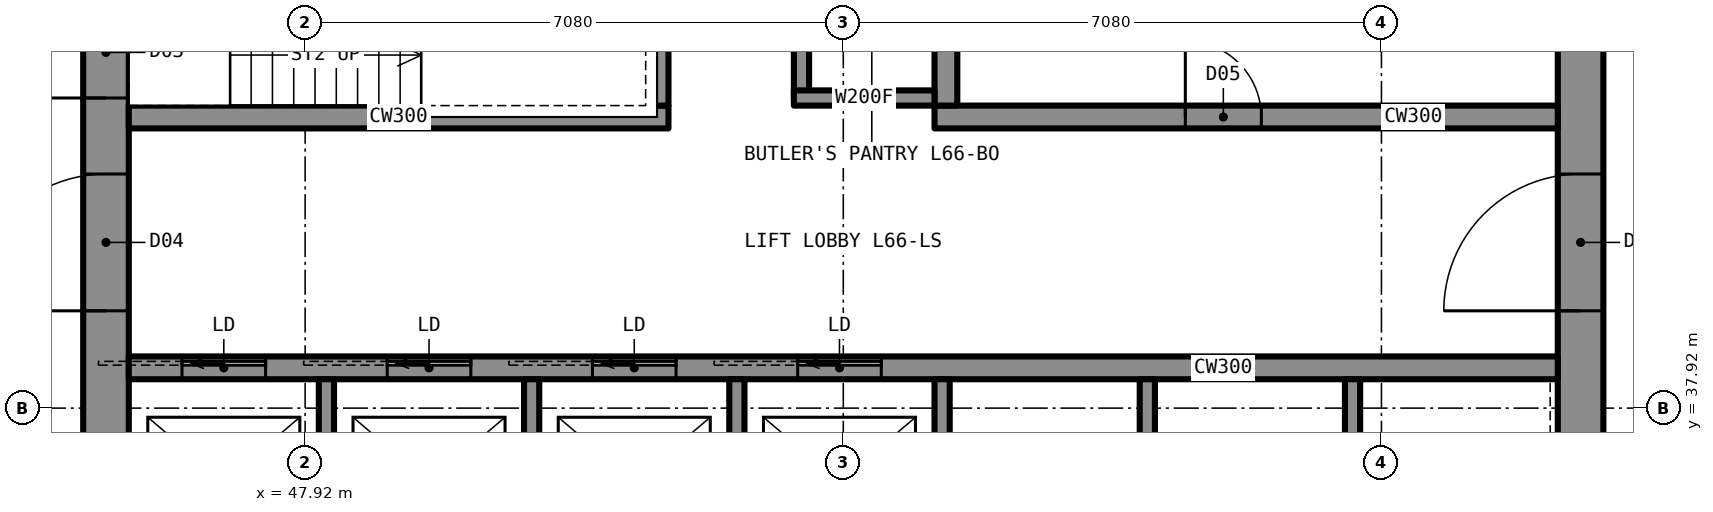
"""IFC4 building model, lengths in metres.
Left out: names, types, materials, properties, quantities, classifications, styles, units other than length and angle.
Written with IfcOpenShell. Run it as: python <this file> out.ifc"""

import sys

from ifc_helpers import new_model, si_unit, direction, frame, frame_2d, origin, place, context, subcontext, project, spatial, rectangle, extrude, element, fill, save


model = new_model("IFC4")
c1 = context("Model", 3, precision=1e-05, world=origin(), true_north=direction((0.0, 1.0)))
c2 = subcontext(c1, "Body", "Model", "MODEL_VIEW")
j1 = project(units=[si_unit("LENGTHUNIT", "METRE"), si_unit("PLANEANGLEUNIT", "RADIAN")], contexts=[c1])
p1 = place(None, origin())
s1 = spatial("IfcSite", under=j1, at=p1, CompositionType="ELEMENT")
p2 = place(p1, origin())
s2 = spatial("IfcBuilding", under=s1, at=p2, CompositionType="ELEMENT")
p3 = place(p2, frame((0.0, 0.0, 237.2)))
s3 = spatial("IfcBuildingStorey", under=s2, at=p3, CompositionType="ELEMENT", Elevation=237.2)
p4 = place(p3, frame((64.7, 35.6, 0.0), z_axis=(0.0, 0.0, 1.0), x_axis=(0.0, 1.0, 0.0)))
e1 = element("IfcWall", 1, at=p4, inside=s3, PredefinedType="SHEAR", context=c2, shape_type="SweptSolid", body=[
    extrude(rectangle(XDim=18.8, YDim=0.6, at=frame_2d((9.4, 0.0))), origin(), (0.0, 0.0, 1.0), 3.5),
])
p5 = place(p4, frame((13.4, 0.0, 0.0)))
e2 = element("IfcOpeningElement", 2, at=p5, cuts=e1, PredefinedType="OPENING", context=c2, shape_type="SweptSolid", body=[
    extrude(rectangle(XDim=1.8, YDim=2.2, at=frame_2d((0.9, 1.1))), frame((0.0, 0.31, 0.0), z_axis=(0.0, -1.0, 0.0), x_axis=(1.0, 0.0, 0.0)), (0.0, 0.0, 1.0), 0.62),
])
p6 = place(p4, frame((3.6, 0.0, 0.0)))
e3 = element("IfcOpeningElement", 3, at=p6, cuts=e1, PredefinedType="OPENING", context=c2, shape_type="SweptSolid", body=[
    extrude(rectangle(XDim=1.8, YDim=2.2, at=frame_2d((0.9, 1.1))), frame((0.0, 0.31, 0.0), z_axis=(0.0, -1.0, 0.0), x_axis=(1.0, 0.0, 0.0)), (0.0, 0.0, 1.0), 0.62),
])
p7 = place(p3, frame((45.3, 35.6, 0.0), z_axis=(0.0, 0.0, 1.0), x_axis=(0.0, 1.0, 0.0)))
e4 = element("IfcWall", 4, at=p7, inside=s3, PredefinedType="SHEAR", context=c2, shape_type="SweptSolid", body=[
    extrude(rectangle(XDim=18.8, YDim=0.6, at=frame_2d((9.4, 0.0))), origin(), (0.0, 0.0, 1.0), 3.5),
])
p8 = place(p7, frame((13.4, 0.0, 0.0)))
e5 = element("IfcOpeningElement", 5, at=p8, cuts=e4, PredefinedType="OPENING", context=c2, shape_type="SweptSolid", body=[
    extrude(rectangle(XDim=1.8, YDim=2.2, at=frame_2d((0.9, 1.1))), frame((0.0, 0.31, 0.0), z_axis=(0.0, -1.0, 0.0), x_axis=(1.0, 0.0, 0.0)), (0.0, 0.0, 1.0), 0.62),
])
p9 = place(p7, frame((3.6, 0.0, 0.0)))
e6 = element("IfcOpeningElement", 6, at=p9, cuts=e4, PredefinedType="OPENING", context=c2, shape_type="SweptSolid", body=[
    extrude(rectangle(XDim=1.8, YDim=2.2, at=frame_2d((0.9, 1.1))), frame((0.0, 0.31, 0.0), z_axis=(0.0, -1.0, 0.0), x_axis=(1.0, 0.0, 0.0)), (0.0, 0.0, 1.0), 0.62),
])
p10 = place(p7, frame((6.4, 0.0, 0.0)))
e7 = element("IfcOpeningElement", 7, at=p10, cuts=e4, PredefinedType="OPENING", context=c2, shape_type="SweptSolid", body=[
    extrude(rectangle(XDim=1.2, YDim=2.2, at=frame_2d((0.6, 1.1))), frame((0.0, 0.31, 0.0), z_axis=(0.0, -1.0, 0.0), x_axis=(1.0, 0.0, 0.0)), (0.0, 0.0, 1.0), 0.62),
])
p11 = place(p3, frame((45.6, 38.45, 0.0), z_axis=(0.0, 0.0, 1.0), x_axis=(1.0, 0.0, 0.0)))
e8 = element("IfcWall", 8, at=p11, inside=s3, PredefinedType="SHEAR", context=c2, shape_type="SweptSolid", body=[
    extrude(rectangle(XDim=18.8, YDim=0.3, at=frame_2d((9.4, 0.0))), origin(), (0.0, 0.0, 1.0), 3.5),
])
p12 = place(p11, frame((0.7, 0.0, 0.0)))
e9 = element("IfcOpeningElement", 9, at=p12, cuts=e8, PredefinedType="OPENING", context=c2, shape_type="SweptSolid", body=[
    extrude(rectangle(XDim=1.1, YDim=2.2, at=frame_2d((0.55, 1.1))), frame((0.0, 0.16, 0.0), z_axis=(0.0, -1.0, 0.0), x_axis=(1.0, 0.0, 0.0)), (0.0, 0.0, 1.0), 0.32),
])
p13 = place(p11, frame((3.4, 0.0, 0.0)))
e10 = element("IfcOpeningElement", 10, at=p13, cuts=e8, PredefinedType="OPENING", context=c2, shape_type="SweptSolid", body=[
    extrude(rectangle(XDim=1.1, YDim=2.2, at=frame_2d((0.55, 1.1))), frame((0.0, 0.16, 0.0), z_axis=(0.0, -1.0, 0.0), x_axis=(1.0, 0.0, 0.0)), (0.0, 0.0, 1.0), 0.32),
])
p14 = place(p11, frame((6.1, 0.0, 0.0)))
e11 = element("IfcOpeningElement", 11, at=p14, cuts=e8, PredefinedType="OPENING", context=c2, shape_type="SweptSolid", body=[
    extrude(rectangle(XDim=1.1, YDim=2.2, at=frame_2d((0.55, 1.1))), frame((0.0, 0.16, 0.0), z_axis=(0.0, -1.0, 0.0), x_axis=(1.0, 0.0, 0.0)), (0.0, 0.0, 1.0), 0.32),
])
p15 = place(p11, frame((8.8, 0.0, 0.0)))
e12 = element("IfcOpeningElement", 12, at=p15, cuts=e8, PredefinedType="OPENING", context=c2, shape_type="SweptSolid", body=[
    extrude(rectangle(XDim=1.1, YDim=2.2, at=frame_2d((0.55, 1.1))), frame((0.0, 0.16, 0.0), z_axis=(0.0, -1.0, 0.0), x_axis=(1.0, 0.0, 0.0)), (0.0, 0.0, 1.0), 0.32),
])
p16 = place(p3, frame((45.6, 41.75, 0.0), z_axis=(0.0, 0.0, 1.0), x_axis=(1.0, 0.0, 0.0)))
e13 = element("IfcWall", 13, at=p16, inside=s3, PredefinedType="SHEAR", context=c2, shape_type="SweptSolid", body=[
    extrude(rectangle(XDim=7.1, YDim=0.3, at=frame_2d((3.55, 0.0))), origin(), (0.0, 0.0, 1.0), 3.5),
])
p17 = place(p3, frame((56.2, 41.75, 0.0), z_axis=(0.0, 0.0, 1.0), x_axis=(1.0, 0.0, 0.0)))
e14 = element("IfcWall", 14, at=p17, inside=s3, PredefinedType="SHEAR", context=c2, shape_type="SweptSolid", body=[
    extrude(rectangle(XDim=8.2, YDim=0.3, at=frame_2d((4.1, 0.0))), origin(), (0.0, 0.0, 1.0), 3.5),
])
p18 = place(p17, frame((3.3, 0.0, 0.0)))
e15 = element("IfcOpeningElement", 15, at=p18, cuts=e14, PredefinedType="OPENING", context=c2, shape_type="SweptSolid", body=[
    extrude(rectangle(XDim=1.0, YDim=2.1, at=frame_2d((0.5, 1.05))), frame((0.0, 0.16, 0.0), z_axis=(0.0, -1.0, 0.0), x_axis=(1.0, 0.0, 0.0)), (0.0, 0.0, 1.0), 0.32),
])
p19 = place(p3, frame((52.55, 41.9, 0.0), z_axis=(0.0, 0.0, 1.0), x_axis=(0.0, 1.0, 0.0)))
e16 = element("IfcWall", 16, at=p19, inside=s3, PredefinedType="SHEAR", context=c2, shape_type="SweptSolid", body=[
    extrude(rectangle(XDim=6.2, YDim=0.3, at=frame_2d((3.1, 0.0))), origin(), (0.0, 0.0, 1.0), 3.5),
])
p20 = place(p19, frame((4.125, 0.0, 0.0)))
e17 = element("IfcOpeningElement", 17, at=p20, cuts=e16, PredefinedType="OPENING", context=c2, shape_type="SweptSolid", body=[
    extrude(rectangle(XDim=1.2, YDim=2.2, at=frame_2d((0.6, 1.1))), frame((0.0, 0.16, 0.0), z_axis=(0.0, -1.0, 0.0), x_axis=(1.0, 0.0, 0.0)), (0.0, 0.0, 1.0), 0.32),
])
p21 = place(p3, frame((56.35, 41.9, 0.0), z_axis=(0.0, 0.0, 1.0), x_axis=(0.0, 1.0, 0.0)))
e18 = element("IfcWall", 18, at=p21, inside=s3, PredefinedType="SHEAR", context=c2, shape_type="SweptSolid", body=[
    extrude(rectangle(XDim=9.5, YDim=0.3, at=frame_2d((4.75, 0.0))), origin(), (0.0, 0.0, 1.0), 3.5),
])
p22 = place(p21, frame((7.1, 0.0, 0.0)))
e19 = element("IfcOpeningElement", 19, at=p22, cuts=e18, PredefinedType="OPENING", context=c2, shape_type="SweptSolid", body=[
    extrude(rectangle(XDim=1.8, YDim=2.2, at=frame_2d((0.9, 1.1))), frame((0.0, 0.16, 0.0), z_axis=(0.0, -1.0, 0.0), x_axis=(1.0, 0.0, 0.0)), (0.0, 0.0, 1.0), 0.32),
])
p23 = place(p3, frame((54.45, 42.0, 0.0), z_axis=(0.0, 0.0, 1.0), x_axis=(0.0, 1.0, 0.0)))
e20 = element("IfcWall", 20, at=p23, inside=s3, PredefinedType="PARTITIONING", context=c2, shape_type="SweptSolid", body=[
    extrude(rectangle(XDim=4.5, YDim=0.2, at=frame_2d((2.25, 0.0))), origin(), (0.0, 0.0, 1.0), 3.33),
])
p24 = place(p23, frame((1.75, 0.0, 0.0)))
e21 = element("IfcOpeningElement", 21, at=p24, cuts=e20, PredefinedType="OPENING", context=c2, shape_type="SweptSolid", body=[
    extrude(rectangle(XDim=1.0, YDim=2.1, at=frame_2d((0.5, 1.05))), frame((0.0, 0.11, 0.0), z_axis=(0.0, -1.0, 0.0), x_axis=(1.0, 0.0, 0.0)), (0.0, 0.0, 1.0), 0.22),
])
p25 = place(p3, frame((54.35, 42.0, 0.0), z_axis=(0.0, 0.0, 1.0), x_axis=(1.0, 0.0, 0.0)))
e22 = element("IfcWall", 22, at=p25, inside=s3, PredefinedType="PARTITIONING", context=c2, shape_type="SweptSolid", body=[
    extrude(rectangle(XDim=1.85, YDim=0.2, at=frame_2d((0.925, 0.0))), origin(), (0.0, 0.0, 1.0), 3.33),
])
for number, where, z_axis, x_axis in (
    (23, (48.2, 35.6, 0.0), (0.0, 0.0, 1.0), (0.0, 1.0, 0.0)),
    (24, (50.9, 35.6, 0.0), (0.0, 0.0, 1.0), (0.0, 1.0, 0.0)),
    (25, (53.6, 35.6, 0.0), (0.0, 0.0, 1.0), (0.0, 1.0, 0.0)),
    (26, (56.3, 35.6, 0.0), (0.0, 0.0, 1.0), (0.0, 1.0, 0.0)),
    (27, (59.0, 35.6, 0.0), (0.0, 0.0, 1.0), (0.0, 1.0, 0.0)),
    (28, (61.7, 35.6, 0.0), (0.0, 0.0, 1.0), (0.0, 1.0, 0.0)),
):
    element("IfcWall", number, at=place(p3, frame(where, z_axis=z_axis, x_axis=x_axis)), inside=s3, PredefinedType="PARTITIONING", context=c2, shape_type="SweptSolid", body=[
        extrude(rectangle(XDim=2.7, YDim=0.2, at=frame_2d((1.35, 0.0))), origin(), (0.0, 0.0, 1.0), 3.33),
    ])
p26 = place(p9, origin())
e29 = element("IfcDoor", 29, at=p26, inside=s3, OperationType="DOUBLE_DOOR_SINGLE_SWING", PredefinedType="DOOR", context=c2, shape_type="SweptSolid", body=[
    extrude(rectangle(XDim=1.8, YDim=2.2, at=frame_2d((0.9, 1.1))), frame((0.0, 0.025, 0.0), z_axis=(0.0, -1.0, 0.0), x_axis=(1.0, 0.0, 0.0)), (0.0, 0.0, 1.0), 0.05),
])
fill(e6, e29)
p27 = place(p6, origin())
e30 = element("IfcDoor", 30, at=p27, inside=s3, OperationType="DOUBLE_DOOR_SINGLE_SWING", PredefinedType="DOOR", context=c2, shape_type="SweptSolid", body=[
    extrude(rectangle(XDim=1.8, YDim=2.2, at=frame_2d((0.9, 1.1))), frame((0.0, 0.025, 0.0), z_axis=(0.0, -1.0, 0.0), x_axis=(1.0, 0.0, 0.0)), (0.0, 0.0, 1.0), 0.05),
])
fill(e3, e30)
p28 = place(p10, origin())
e31 = element("IfcDoor", 31, at=p28, inside=s3, OperationType="SINGLE_SWING_LEFT", PredefinedType="DOOR", context=c2, shape_type="SweptSolid", body=[
    extrude(rectangle(XDim=1.2, YDim=2.2, at=frame_2d((0.6, 1.1))), frame((0.0, 0.025, 0.0), z_axis=(0.0, -1.0, 0.0), x_axis=(1.0, 0.0, 0.0)), (0.0, 0.0, 1.0), 0.05),
])
fill(e7, e31)
p29 = place(p18, origin())
e32 = element("IfcDoor", 32, at=p29, inside=s3, OperationType="SINGLE_SWING_LEFT", PredefinedType="DOOR", context=c2, shape_type="SweptSolid", body=[
    extrude(rectangle(XDim=1.0, YDim=2.1, at=frame_2d((0.5, 1.05))), frame((0.0, 0.025, 0.0), z_axis=(0.0, -1.0, 0.0), x_axis=(1.0, 0.0, 0.0)), (0.0, 0.0, 1.0), 0.05),
])
fill(e15, e32)
p30 = place(p12, origin())
e33 = element("IfcDoor", 33, at=p30, inside=s3, OperationType="SLIDING_TO_LEFT", PredefinedType="DOOR", context=c2, shape_type="SweptSolid", body=[
    extrude(rectangle(XDim=1.1, YDim=2.2, at=frame_2d((0.55, 1.1))), frame((0.0, 0.025, 0.0), z_axis=(0.0, -1.0, 0.0), x_axis=(1.0, 0.0, 0.0)), (0.0, 0.0, 1.0), 0.05),
])
fill(e9, e33)
p31 = place(p13, origin())
e34 = element("IfcDoor", 34, at=p31, inside=s3, OperationType="SLIDING_TO_LEFT", PredefinedType="DOOR", context=c2, shape_type="SweptSolid", body=[
    extrude(rectangle(XDim=1.1, YDim=2.2, at=frame_2d((0.55, 1.1))), frame((0.0, 0.025, 0.0), z_axis=(0.0, -1.0, 0.0), x_axis=(1.0, 0.0, 0.0)), (0.0, 0.0, 1.0), 0.05),
])
fill(e10, e34)
p32 = place(p14, origin())
e35 = element("IfcDoor", 35, at=p32, inside=s3, OperationType="SLIDING_TO_LEFT", PredefinedType="DOOR", context=c2, shape_type="SweptSolid", body=[
    extrude(rectangle(XDim=1.1, YDim=2.2, at=frame_2d((0.55, 1.1))), frame((0.0, 0.025, 0.0), z_axis=(0.0, -1.0, 0.0), x_axis=(1.0, 0.0, 0.0)), (0.0, 0.0, 1.0), 0.05),
])
fill(e11, e35)
p33 = place(p15, origin())
e36 = element("IfcDoor", 36, at=p33, inside=s3, OperationType="SLIDING_TO_LEFT", PredefinedType="DOOR", context=c2, shape_type="SweptSolid", body=[
    extrude(rectangle(XDim=1.1, YDim=2.2, at=frame_2d((0.55, 1.1))), frame((0.0, 0.025, 0.0), z_axis=(0.0, -1.0, 0.0), x_axis=(1.0, 0.0, 0.0)), (0.0, 0.0, 1.0), 0.05),
])
fill(e12, e36)
save(model, sys.argv[1])
